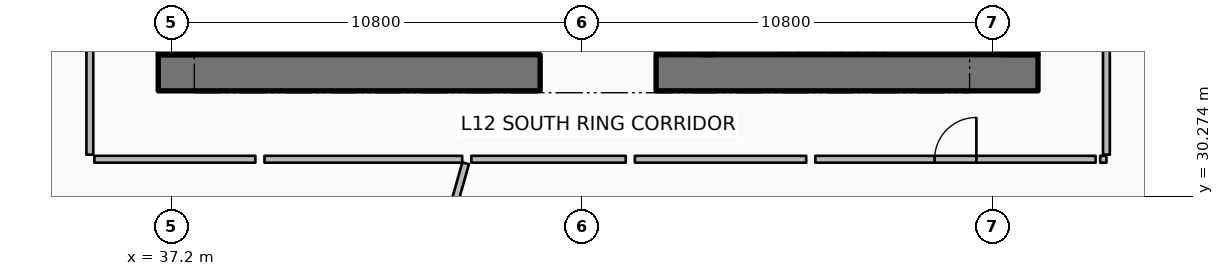
"""IFC4 building model, lengths in metres.
Left out: names, types, materials, properties, quantities, classifications, styles, units other than length and angle.
Written with IfcOpenShell. Run it as: python <this file> out.ifc"""

import sys

from ifc_helpers import new_model, si_unit, direction, frame, frame_2d, origin, place, context, subcontext, project, spatial, rectangle, extrude, element, fill, save


model = new_model("IFC4")
c1 = context("Model", 3, precision=1e-05, world=origin(), true_north=direction((0.0, 1.0)))
c2 = subcontext(c1, "Body", "Model", "MODEL_VIEW")
j1 = project(units=[si_unit("LENGTHUNIT", "METRE"), si_unit("PLANEANGLEUNIT", "RADIAN")], contexts=[c1])
p1 = place(None, origin())
s1 = spatial("IfcSite", under=j1, at=p1, CompositionType="ELEMENT")
p2 = place(p1, origin())
s2 = spatial("IfcBuilding", under=s1, at=p2, CompositionType="ELEMENT")
p3 = place(p2, frame((0.0, 0.0, 52.65)))
s3 = spatial("IfcBuildingStorey", under=s2, at=p3, CompositionType="ELEMENT", Elevation=52.65)
p4 = place(p3, frame((36.85, 33.525, 0.0), z_axis=(0.0, 0.0, 1.0), x_axis=(1.0, 0.0, 0.0)))
e1 = element("IfcWall", 1, at=p4, inside=s3, PredefinedType="SHEAR", context=c2, shape_type="SweptSolid", body=[
    extrude(rectangle(XDim=10.05, YDim=0.95, at=frame_2d((5.025, 0.0))), origin(), (0.0, 0.0, 1.0), 3.75),
])
p5 = place(p3, frame((49.95, 33.525, 0.0), z_axis=(0.0, 0.0, 1.0), x_axis=(1.0, 0.0, 0.0)))
e2 = element("IfcWall", 2, at=p5, inside=s3, PredefinedType="SHEAR", context=c2, shape_type="SweptSolid", body=[
    extrude(rectangle(XDim=10.05, YDim=0.95, at=frame_2d((5.025, 0.0))), origin(), (0.0, 0.0, 1.0), 3.75),
])
for number, where, z_axis, x_axis in (
    (3, (37.325, 34.0, 0.0), (0.0, 0.0, 1.0), (0.0, 1.0, 0.0)),
    (4, (59.525, 34.0, 0.0), (0.0, 0.0, 1.0), (0.0, 1.0, 0.0)),
):
    element("IfcWall", number, at=place(p3, frame(where, z_axis=z_axis, x_axis=x_axis)), inside=s3, PredefinedType="SHEAR", context=c2, shape_type="SweptSolid", body=[
        extrude(rectangle(XDim=16.0, YDim=0.95, at=frame_2d((8.0, 0.0))), origin(), (0.0, 0.0, 1.0), 3.75),
    ])
p6 = place(p3, frame((51.31, 34.0, 0.0), z_axis=(0.0, 0.0, 1.0), x_axis=(0.0, 1.0, 0.0)))
e5 = element("IfcWall", 5, at=p6, inside=s3, PredefinedType="SHEAR", context=c2, shape_type="SweptSolid", body=[
    extrude(rectangle(XDim=3.5, YDim=0.28, at=frame_2d((1.75, 0.0))), origin(), (0.0, 0.0, 1.0), 3.75),
])
p7 = place(p3, frame((44.938, 31.144, 0.0), z_axis=(0.0, 0.0, 1.0), x_axis=(-0.27143758514, -0.962456044385, 0.0)))
e6 = element("IfcWall", 6, at=p7, inside=s3, PredefinedType="PARTITIONING", context=c2, shape_type="SweptSolid", body=[
    extrude(rectangle(XDim=16.693, YDim=0.18, at=frame_2d((8.346, 0.0))), origin(), (0.0, 0.0, 1.0), 2.867),
])
p8 = place(p3, frame((61.906, 38.078, 0.0), z_axis=(0.0, 0.0, 1.0), x_axis=(0.962455862511, -0.271438230022, 0.0)))
e7 = element("IfcWall", 7, at=p8, inside=s3, PredefinedType="PARTITIONING", context=c2, shape_type="SweptSolid", body=[
    extrude(rectangle(XDim=16.126, YDim=0.18, at=frame_2d((8.063, 0.0))), origin(), (0.0, 0.0, 1.0), 2.867),
])
p9 = place(p3, frame((35.05, 34.628, 0.0), z_axis=(0.0, 0.0, 1.0), x_axis=(0.0, -1.0, 0.0)))
e8 = element("IfcWall", 8, at=p9, inside=s3, PredefinedType="PARTITIONING", context=c2, shape_type="SweptSolid", body=[
    extrude(rectangle(XDim=3.258, YDim=0.18, at=frame_2d((1.629, 0.0))), origin(), (0.0, 0.0, 1.0), 2.867),
])
p10 = place(p3, frame((35.17, 31.25, 0.0), z_axis=(0.0, 0.0, 1.0), x_axis=(1.0, 0.0, 0.0)))
e9 = element("IfcWall", 9, at=p10, inside=s3, PredefinedType="PARTITIONING", context=c2, shape_type="SweptSolid", body=[
    extrude(rectangle(XDim=4.236, YDim=0.18, at=frame_2d((2.118, 0.0))), origin(), (0.0, 0.0, 1.0), 2.867),
])
p11 = place(p3, frame((39.646, 31.25, 0.0), z_axis=(0.0, 0.0, 1.0), x_axis=(1.0, 0.0, 0.0)))
e10 = element("IfcWall", 10, at=p11, inside=s3, PredefinedType="PARTITIONING", context=c2, shape_type="SweptSolid", body=[
    extrude(rectangle(XDim=5.203, YDim=0.18, at=frame_2d((2.601, 0.0))), origin(), (0.0, 0.0, 1.0), 2.867),
])
p12 = place(p3, frame((54.14, 31.25, 0.0), z_axis=(0.0, 0.0, 1.0), x_axis=(1.0, 0.0, 0.0)))
e11 = element("IfcWall", 11, at=p12, inside=s3, PredefinedType="PARTITIONING", context=c2, shape_type="SweptSolid", body=[
    extrude(rectangle(XDim=7.376, YDim=0.18, at=frame_2d((3.688, 0.0))), origin(), (0.0, 0.0, 1.0), 2.867),
])
p13 = place(p12, frame((3.138, 0.0, 0.0)))
e12 = element("IfcOpeningElement", 12, at=p13, cuts=e11, PredefinedType="OPENING", context=c2, shape_type="SweptSolid", body=[
    extrude(rectangle(XDim=1.1, YDim=2.1, at=frame_2d((0.55, 1.05))), frame((0.0, 0.1, 0.0), z_axis=(0.0, -1.0, 0.0), x_axis=(1.0, 0.0, 0.0)), (0.0, 0.0, 1.0), 0.2),
])
p14 = place(p3, frame((45.088, 31.25, 0.0), z_axis=(0.0, 0.0, 1.0), x_axis=(1.0, 0.0, 0.0)))
e13 = element("IfcWall", 13, at=p14, inside=s3, PredefinedType="PARTITIONING", context=c2, shape_type="SweptSolid", body=[
    extrude(rectangle(XDim=4.064, YDim=0.18, at=frame_2d((2.032, 0.0))), origin(), (0.0, 0.0, 1.0), 2.867),
])
p15 = place(p3, frame((49.392, 31.25, 0.0), z_axis=(0.0, 0.0, 1.0), x_axis=(1.0, 0.0, 0.0)))
e14 = element("IfcWall", 14, at=p15, inside=s3, PredefinedType="PARTITIONING", context=c2, shape_type="SweptSolid", body=[
    extrude(rectangle(XDim=4.508, YDim=0.18, at=frame_2d((2.254, 0.0))), origin(), (0.0, 0.0, 1.0), 2.867),
])
p16 = place(p3, frame((61.636, 31.25, 0.0), z_axis=(0.0, 0.0, 1.0), x_axis=(1.0, 0.0, 0.0)))
e15 = element("IfcWall", 15, at=p16, inside=s3, PredefinedType="PARTITIONING", context=c2, shape_type="SweptSolid", body=[
    extrude(rectangle(XDim=0.164, YDim=0.18, at=frame_2d((0.082, 0.0))), origin(), (0.0, 0.0, 1.0), 2.867),
])
p17 = place(p3, frame((61.8, 31.37, 0.0), z_axis=(0.0, 0.0, 1.0), x_axis=(0.0, 1.0, 0.0)))
e16 = element("IfcWall", 16, at=p17, inside=s3, PredefinedType="PARTITIONING", context=c2, shape_type="SweptSolid", body=[
    extrude(rectangle(XDim=6.618, YDim=0.18, at=frame_2d((3.309, 0.0))), origin(), (0.0, 0.0, 1.0), 2.867),
])
p18 = place(p13, origin())
e17 = element("IfcDoor", 17, at=p18, inside=s3, OperationType="SINGLE_SWING_RIGHT", PredefinedType="DOOR", context=c2, shape_type="SweptSolid", body=[
    extrude(rectangle(XDim=1.1, YDim=2.1, at=frame_2d((0.55, 1.05))), frame((0.0, 0.025, 0.0), z_axis=(0.0, -1.0, 0.0), x_axis=(1.0, 0.0, 0.0)), (0.0, 0.0, 1.0), 0.05),
])
fill(e12, e17)
save(model, sys.argv[1])
